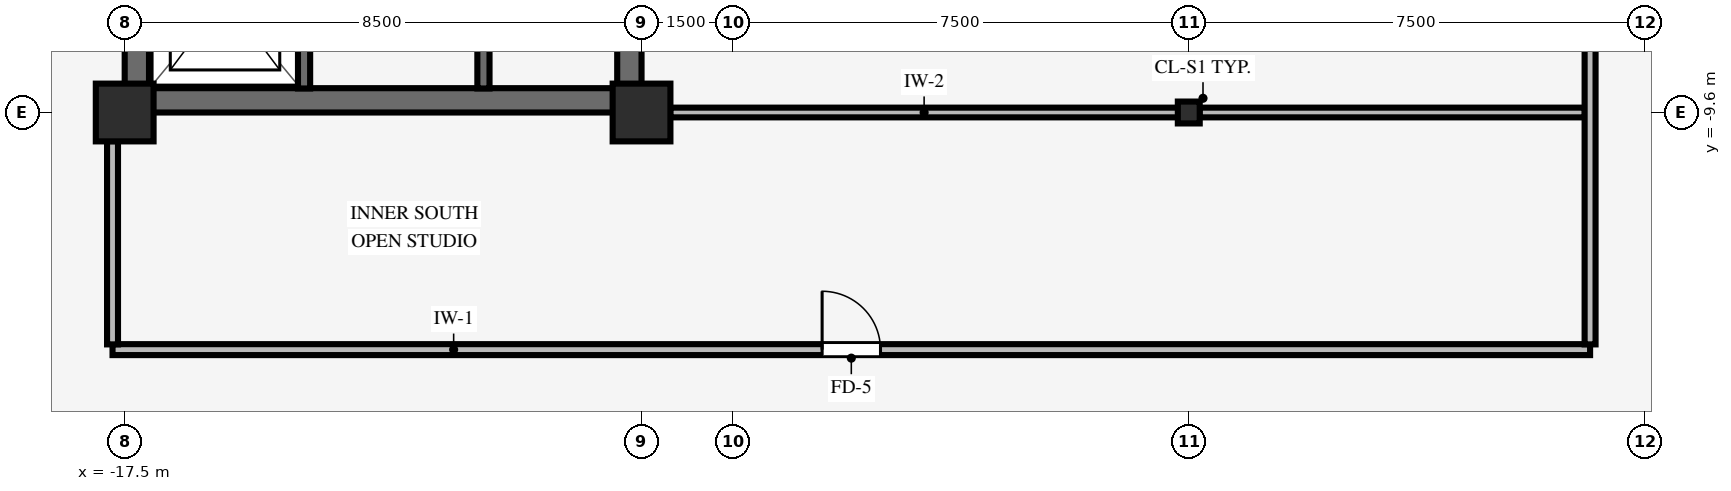
"""IFC4 building model, lengths in metres.
Left out: names, types, materials, properties, quantities, classifications, styles, units other than length and angle.
Written with IfcOpenShell. Run it as: python <this file> out.ifc"""

import sys

from ifc_helpers import new_model, si_unit, direction, frame, frame_2d, origin, origin_2d, place, context, subcontext, project, spatial, rectangle, i_section, extrude, source, transform, mapped, element, fill, save


model = new_model("IFC4")
c1 = context("Model", 3, precision=1e-05, world=origin(), true_north=direction((0.0, 1.0)))
c2 = subcontext(c1, "Body", "Model", "MODEL_VIEW")
j1 = project(units=[si_unit("LENGTHUNIT", "METRE"), si_unit("PLANEANGLEUNIT", "RADIAN")], contexts=[c1])
p1 = place(None, origin())
s1 = spatial("IfcSite", under=j1, at=p1, CompositionType="ELEMENT")
p2 = place(p1, origin())
s2 = spatial("IfcBuilding", under=s1, at=p2, CompositionType="ELEMENT")
p3 = place(p2, frame((0.0, 0.0, 160.35)))
s3 = spatial("IfcBuildingStorey", under=s2, at=p3, CompositionType="ELEMENT", Elevation=160.35)
p4 = place(p3, frame((-17.5, -9.4, 0.0), z_axis=(0.0, 0.0, 1.0), x_axis=(1.0, 0.0, 0.0)))
e1 = element("IfcWall", 1, at=p4, inside=s3, PredefinedType="SHEAR", context=c2, shape_type="SweptSolid", body=[
    extrude(rectangle(XDim=8.5, YDim=0.4, at=frame_2d((4.25, 0.0))), origin(), (0.0, 0.0, 1.0), 3.37),
])
p5 = place(p3, frame((-17.3, -9.205, 0.0), z_axis=(0.0, 0.0, 1.0), x_axis=(0.0, 1.0, 0.0)))
e2 = element("IfcWall", 2, at=p5, inside=s3, PredefinedType="SHEAR", context=c2, shape_type="SweptSolid", body=[
    extrude(rectangle(XDim=18.41, YDim=0.4, at=frame_2d((9.205, 0.0))), origin(), (0.0, 0.0, 1.0), 3.37),
])
p6 = place(p3, frame((-9.2, -9.205, 0.0), z_axis=(0.0, 0.0, 1.0), x_axis=(0.0, 1.0, 0.0)))
e3 = element("IfcWall", 3, at=p6, inside=s3, PredefinedType="SHEAR", context=c2, shape_type="SweptSolid", body=[
    extrude(rectangle(XDim=18.41, YDim=0.4, at=frame_2d((9.205, 0.0))), origin(), (0.0, 0.0, 1.0), 3.37),
])
p7 = place(p6, frame((8.605, 0.0, 0.0)))
e4 = element("IfcOpeningElement", 4, at=p7, cuts=e3, PredefinedType="OPENING", context=c2, shape_type="SweptSolid", body=[
    extrude(rectangle(XDim=1.2, YDim=2.15, at=frame_2d((0.6, 1.075))), frame((0.0, 0.21, 0.0), z_axis=(0.0, -1.0, 0.0), x_axis=(1.0, 0.0, 0.0)), (0.0, 0.0, 1.0), 0.42),
])
for number, where, z_axis, x_axis in (
    (5, (-17.5, -9.6, 0.0), (0.0, 0.0, 1.0), (1.0, 0.0, 0.0)),
    (6, (-9.0, -9.6, 0.0), (0.0, 0.0, 1.0), (1.0, 0.0, 0.0)),
):
    element("IfcColumn", number, at=place(p3, frame(where, z_axis=z_axis, x_axis=x_axis)), inside=s3, PredefinedType="COLUMN", context=c2, shape_type="SweptSolid", body=[
        extrude(rectangle(XDim=0.95, YDim=0.95, at=origin_2d()), origin(), (0.0, 0.0, 1.0), 3.37),
    ])
p8 = place(p3, frame((0.0, -9.6, 0.0), z_axis=(0.0, 0.0, 1.0), x_axis=(1.0, 0.0, 0.0)))
e7 = element("IfcColumn", 7, at=p8, inside=s3, PredefinedType="COLUMN", context=c2, shape_type="SweptSolid", body=[
    extrude(i_section(OverallWidth=0.36, OverallDepth=0.36, WebThickness=0.021, FlangeThickness=0.021, FilletRadius=0.018, at=origin_2d()), origin(), (0.0, 0.0, 1.0), 3.37),
])
p9 = place(p3, frame((-14.55, -9.205, 0.0), z_axis=(0.0, 0.0, 1.0), x_axis=(0.0, 1.0, 0.0)))
e8 = element("IfcWall", 8, at=p9, inside=s3, PredefinedType="SHEAR", context=c2, shape_type="SweptSolid", body=[
    extrude(rectangle(XDim=3.01, YDim=0.2, at=frame_2d((1.505, 0.0))), origin(), (0.0, 0.0, 1.0), 3.37),
])
p10 = place(p9, frame((0.93, 0.0, 0.0)))
e9 = element("IfcOpeningElement", 9, at=p10, cuts=e8, PredefinedType="OPENING", context=c2, shape_type="SweptSolid", body=[
    extrude(rectangle(XDim=1.15, YDim=2.15, at=frame_2d((0.575, 1.075))), frame((0.0, 0.11, 0.0), z_axis=(0.0, -1.0, 0.0), x_axis=(1.0, 0.0, 0.0)), (0.0, 0.0, 1.0), 0.22),
])
p11 = place(p3, frame((-11.6, -9.205, 0.0), z_axis=(0.0, 0.0, 1.0), x_axis=(0.0, 1.0, 0.0)))
e10 = element("IfcWall", 10, at=p11, inside=s3, PredefinedType="SHEAR", context=c2, shape_type="SweptSolid", body=[
    extrude(rectangle(XDim=7.975, YDim=0.2, at=frame_2d((3.988, 0.0))), origin(), (0.0, 0.0, 1.0), 3.37),
])
p12 = place(p11, frame((1.565, 0.0, 0.0)))
e11 = element("IfcOpeningElement", 11, at=p12, cuts=e10, PredefinedType="OPENING", context=c2, shape_type="SweptSolid", body=[
    extrude(rectangle(XDim=0.88, YDim=2.1, at=frame_2d((0.44, 1.05))), frame((0.0, 0.11, 0.0), z_axis=(0.0, -1.0, 0.0), x_axis=(1.0, 0.0, 0.0)), (0.0, 0.0, 1.0), 0.22),
])
p13 = place(p11, frame((5.565, 0.0, 0.0)))
e12 = element("IfcOpeningElement", 12, at=p13, cuts=e10, PredefinedType="OPENING", context=c2, shape_type="SweptSolid", body=[
    extrude(rectangle(XDim=0.88, YDim=2.1, at=frame_2d((0.44, 1.05))), frame((0.0, 0.11, 0.0), z_axis=(0.0, -1.0, 0.0), x_axis=(1.0, 0.0, 0.0)), (0.0, 0.0, 1.0), 0.22),
])
p14 = place(p3, frame((-17.7, -13.5, 0.0), z_axis=(0.0, 0.0, 1.0), x_axis=(1.0, 0.0, 0.0)))
e13 = element("IfcWall", 13, at=p14, inside=s3, PredefinedType="PARTITIONING", context=c2, shape_type="SweptSolid", body=[
    extrude(rectangle(XDim=24.3, YDim=0.18, at=frame_2d((12.15, 0.0))), origin(), (0.0, 0.0, 1.0), 2.998),
])
p15 = place(p14, frame((11.67, 0.0, 0.0)))
e14 = element("IfcOpeningElement", 14, at=p15, cuts=e13, PredefinedType="OPENING", context=c2, shape_type="SweptSolid", body=[
    extrude(rectangle(XDim=0.96, YDim=2.1, at=frame_2d((0.48, 1.05))), frame((0.0, 0.1, 0.0), z_axis=(0.0, -1.0, 0.0), x_axis=(1.0, 0.0, 0.0)), (0.0, 0.0, 1.0), 0.2),
])
p16 = place(p3, frame((-8.529, -9.6, 0.0), z_axis=(0.0, 0.0, 1.0), x_axis=(1.0, 0.0, 0.0)))
e15 = element("IfcWall", 15, at=p16, inside=s3, PredefinedType="PARTITIONING", context=c2, shape_type="SweptSolid", body=[
    extrude(rectangle(XDim=8.353, YDim=0.16, at=frame_2d((4.177, 0.0))), origin(), (0.0, 0.0, 1.0), 2.405),
])
p17 = place(p3, frame((0.176, -9.6, 0.0), z_axis=(0.0, 0.0, 1.0), x_axis=(1.0, 0.0, 0.0)))
e16 = element("IfcWall", 16, at=p17, inside=s3, PredefinedType="PARTITIONING", context=c2, shape_type="SweptSolid", body=[
    extrude(rectangle(XDim=6.338, YDim=0.16, at=frame_2d((3.169, 0.0))), origin(), (0.0, 0.0, 1.0), 2.405),
])
p18 = place(p3, frame((-17.7, -13.414, 0.0), z_axis=(0.0, 0.0, 1.0), x_axis=(0.0, 1.0, 0.0)))
e17 = element("IfcWall", 17, at=p18, inside=s3, PredefinedType="PARTITIONING", context=c2, shape_type="SweptSolid", body=[
    extrude(rectangle(XDim=3.343, YDim=0.18, at=frame_2d((1.671, 0.0))), origin(), (0.0, 0.0, 1.0), 2.816),
])
p19 = place(p3, frame((6.6, -13.414, 0.0), z_axis=(0.0, 0.0, 1.0), x_axis=(0.0, 1.0, 0.0)))
e18 = element("IfcWall", 18, at=p19, inside=s3, PredefinedType="PARTITIONING", context=c2, shape_type="SweptSolid", body=[
    extrude(rectangle(XDim=12.078, YDim=0.18, at=frame_2d((6.039, 0.0))), origin(), (0.0, 0.0, 1.0), 3.36),
])
m1 = source(origin(), c2, "Body", "SweptSolid", [
    extrude(rectangle(XDim=0.96, YDim=2.1, at=frame_2d((0.48, 1.05))), frame((0.0, 0.025, 0.0), z_axis=(0.0, -1.0, 0.0), x_axis=(1.0, 0.0, 0.0)), (0.0, 0.0, 1.0), 0.05),
])
p20 = place(p15, origin())
e19 = element("IfcDoor", 19, at=p20, inside=s3, OperationType="SINGLE_SWING_LEFT", PredefinedType="DOOR", context=c2, shape_type="MappedRepresentation", body=[
    mapped(m1, transform((0.0, 0.0, 0.0), scale=1.0)),
])
fill(e14, e19)
save(model, sys.argv[1])
